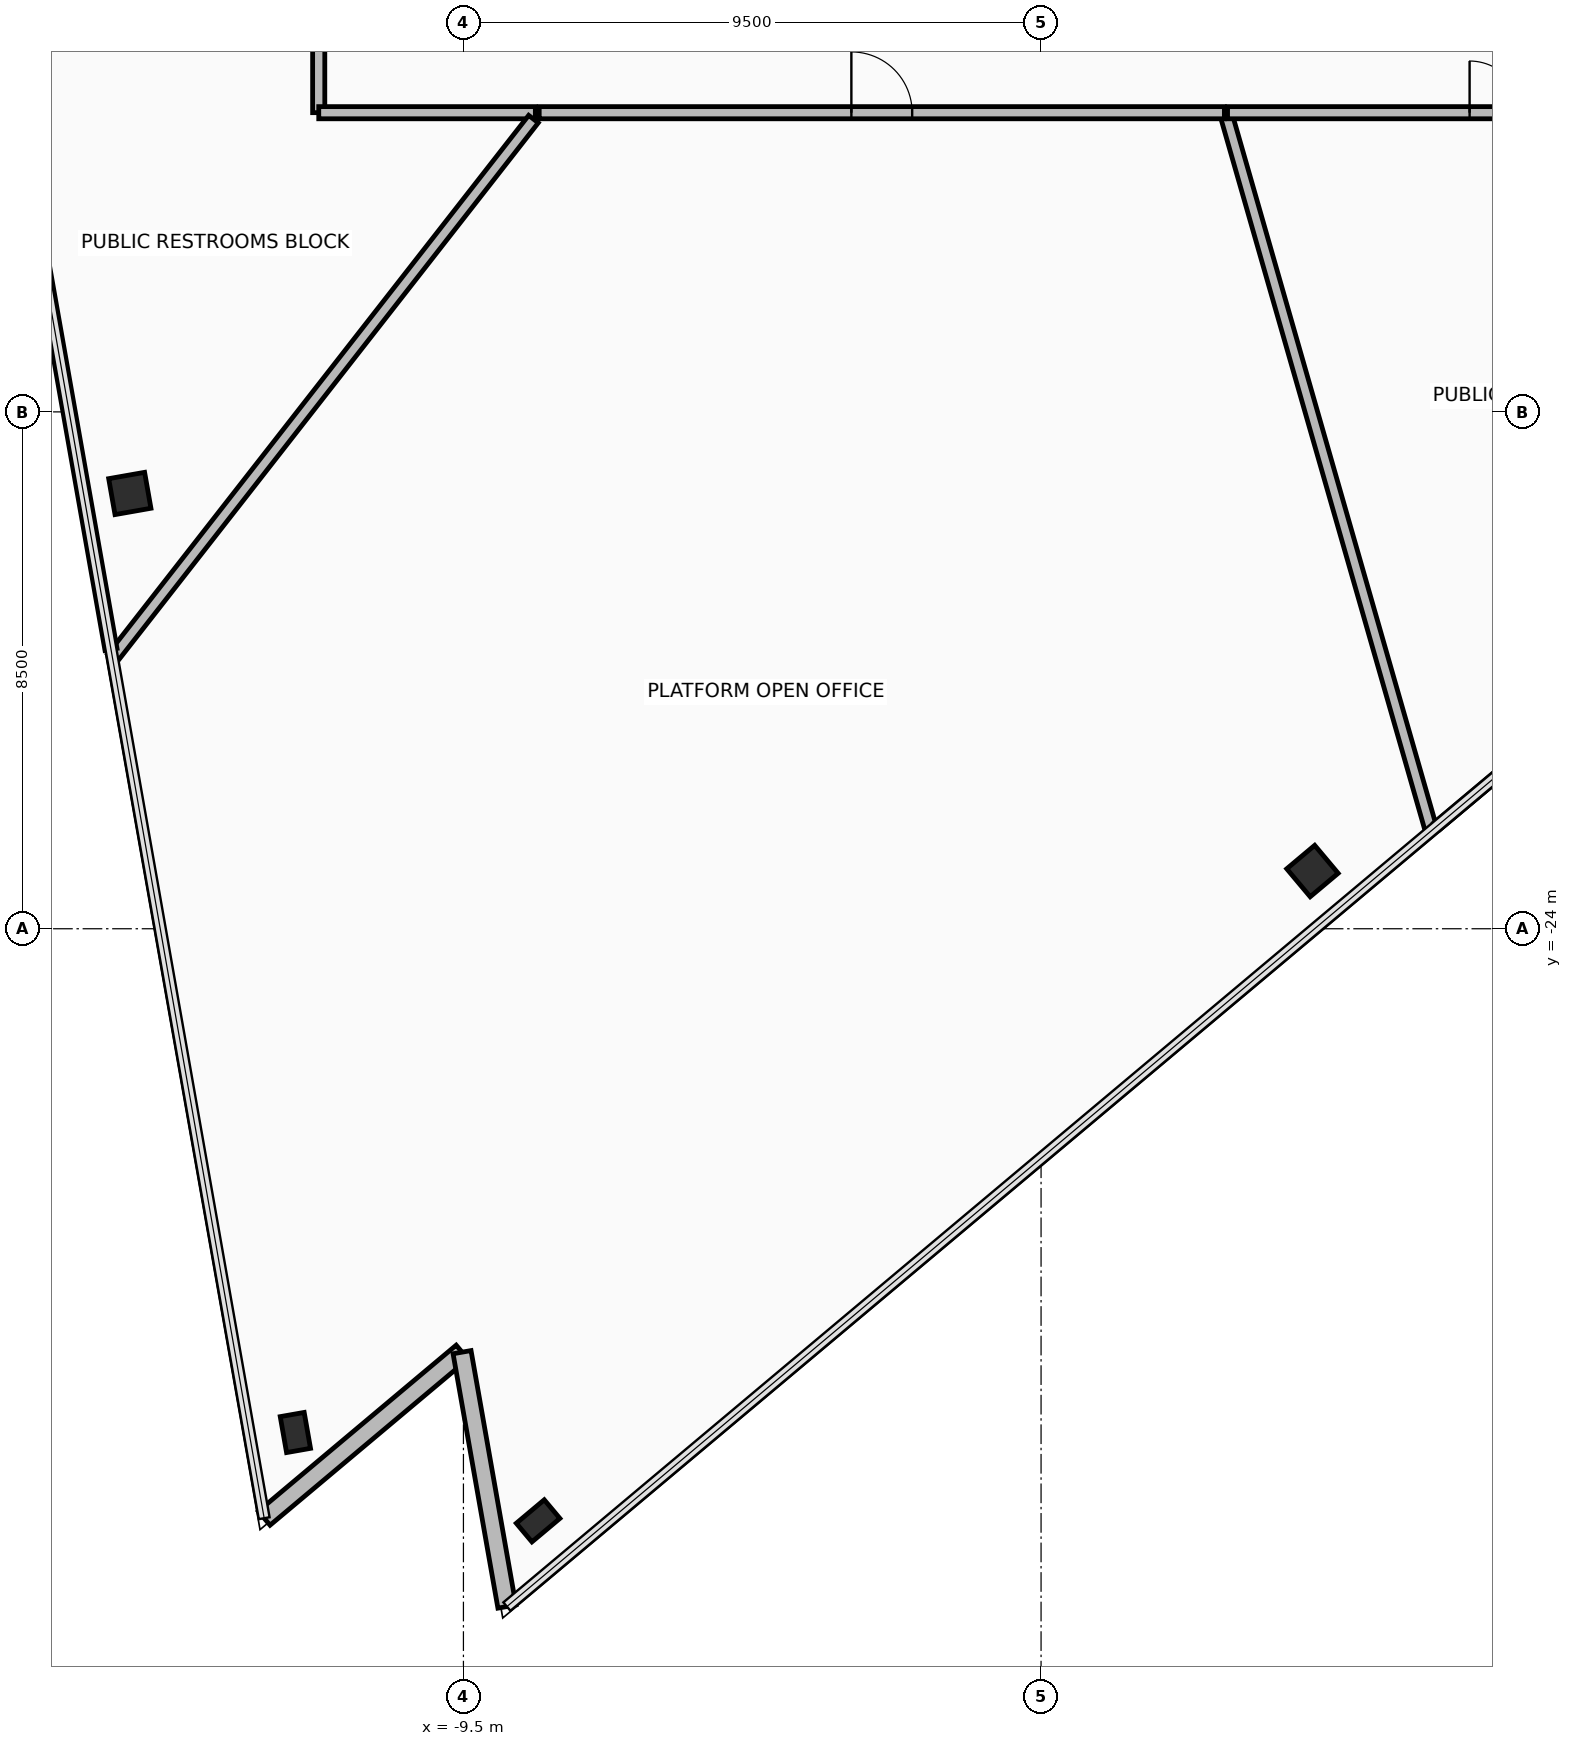
"""IFC4 building model, lengths in metres.
Left out: names, types, materials, properties, quantities, classifications, styles, units other than length and angle.
Written with IfcOpenShell. Run it as: python <this file> out.ifc"""

import sys

from ifc_helpers import new_model, si_unit, direction, frame, frame_2d, origin, origin_2d, place, context, subcontext, project, spatial, rectangle, hollow_rectangle, extrude, element, fill, save


model = new_model("IFC4")
c1 = context("Model", 3, precision=1e-05, world=origin(), true_north=direction((0.0, 1.0)))
c2 = subcontext(c1, "Body", "Model", "MODEL_VIEW")
j1 = project(units=[si_unit("LENGTHUNIT", "METRE"), si_unit("PLANEANGLEUNIT", "RADIAN")], contexts=[c1])
p1 = place(None, origin())
s1 = spatial("IfcSite", under=j1, at=p1, CompositionType="ELEMENT")
p2 = place(p1, origin())
s2 = spatial("IfcBuilding", under=s1, at=p2, CompositionType="ELEMENT")
p3 = place(p2, frame((0.0, 0.0, 188.5)))
s3 = spatial("IfcBuildingStorey", under=s2, at=p3, CompositionType="ELEMENT", Elevation=188.5)
p4 = place(p3, frame((-14.987, -16.842, 0.0), z_axis=(0.0, 0.0, 1.0), x_axis=(-0.173648177667, 0.984807753012, 0.0)))
e1 = element("IfcColumn", 1, at=p4, inside=s3, PredefinedType="COLUMN", context=c2, shape_type="SweptSolid", body=[
    extrude(hollow_rectangle(XDim=0.6, YDim=0.6, WallThickness=0.036, at=origin_2d()), origin(), (0.0, 0.0, 1.0), 3.6),
])
for number, where, z_axis, x_axis in (
    (2, (-12.264, -32.284, 0.0), (0.0, 0.0, 1.0), (-0.174, 0.985, 0.0)),
    (3, (-8.272, -33.737, 0.0), (0.0, 0.0, 1.0), (0.766, 0.643, 0.0)),
):
    element("IfcColumn", number, at=place(p3, frame(where, z_axis=z_axis, x_axis=x_axis)), inside=s3, PredefinedType="COLUMN", context=c2, shape_type="SweptSolid", body=[
        extrude(hollow_rectangle(XDim=0.4, YDim=0.6, WallThickness=0.03, at=origin_2d()), origin(), (0.0, 0.0, 1.0), 3.6),
    ])
p5 = place(p3, frame((4.463, -23.051, 0.0), z_axis=(0.0, 0.0, 1.0), x_axis=(0.766043321242, 0.642788946685, 0.0)))
e4 = element("IfcColumn", 4, at=p5, inside=s3, PredefinedType="COLUMN", context=c2, shape_type="SweptSolid", body=[
    extrude(hollow_rectangle(XDim=0.6, YDim=0.6, WallThickness=0.036, at=origin_2d()), origin(), (0.0, 0.0, 1.0), 3.6),
])
for number, where, z_axis, x_axis in (
    (5, (-12.777, -33.694, 0.0), (0.0, 0.0, 1.0), (0.766, 0.643, 0.0)),
    (6, (-9.523, -30.963, 0.0), (0.0, 0.0, 1.0), (0.174, -0.985, 0.0)),
):
    element("IfcWall", number, at=place(p3, frame(where, z_axis=z_axis, x_axis=x_axis)), inside=s3, PredefinedType="STANDARD", context=c2, shape_type="SweptSolid", body=[
        extrude(rectangle(XDim=4.248, YDim=0.3, at=frame_2d((2.124, 0.0))), origin(), (0.0, 0.0, 1.0), 2.715),
    ])
p6 = place(p3, frame((-11.88, -1.925, 0.0), z_axis=(0.0, 0.0, 1.0), x_axis=(0.0, -1.0, 0.0)))
e7 = element("IfcWall", 7, at=p6, inside=s3, PredefinedType="PARTITIONING", context=c2, shape_type="SweptSolid", body=[
    extrude(rectangle(XDim=8.654, YDim=0.2, at=frame_2d((4.327, 0.0))), origin(), (0.0, 0.0, 1.0), 2.865),
])
p7 = place(p6, frame((3.902, 0.0, 0.0)))
e8 = element("IfcOpeningElement", 8, at=p7, cuts=e7, PredefinedType="OPENING", context=c2, shape_type="SweptSolid", body=[
    extrude(rectangle(XDim=0.85, YDim=2.1, at=frame_2d((0.425, 1.05))), frame((0.0, 0.11, 0.0), z_axis=(0.0, -1.0, 0.0), x_axis=(1.0, 0.0, 0.0)), (0.0, 0.0, 1.0), 0.22),
])
p8 = place(p3, frame((-11.879, -10.58, 0.0), z_axis=(0.0, 0.0, 1.0), x_axis=(1.0, 0.0, 0.0)))
e9 = element("IfcWall", 9, at=p8, inside=s3, PredefinedType="PARTITIONING", context=c2, shape_type="SweptSolid", body=[
    extrude(rectangle(XDim=3.562, YDim=0.2, at=frame_2d((1.781, 0.0))), origin(), (0.0, 0.0, 1.0), 2.865),
])
p9 = place(p3, frame((-8.348, -10.685, 0.0), z_axis=(0.0, 0.0, 1.0), x_axis=(-0.615667634963, -0.788005941132, 0.0)))
e10 = element("IfcWall", 10, at=p9, inside=s3, PredefinedType="PARTITIONING", context=c2, shape_type="SweptSolid", body=[
    extrude(rectangle(XDim=11.245, YDim=0.2, at=frame_2d((5.623, 0.0))), origin(), (0.0, 0.0, 1.0), 2.715),
])
p10 = place(p3, frame((-15.296, -19.407, 0.0), z_axis=(0.0, 0.0, 1.0), x_axis=(-0.17365370915, 0.984806777646, 0.0)))
e11 = element("IfcWall", 11, at=p10, inside=s3, PredefinedType="PARTITIONING", context=c2, shape_type="SweptSolid", body=[
    extrude(rectangle(XDim=17.671, YDim=0.2, at=frame_2d((8.835, 0.0))), origin(), (0.0, 0.0, 1.0), 3.42),
])
p11 = place(p3, frame((6.42, -22.388, 0.0), z_axis=(0.0, 0.0, 1.0), x_axis=(-0.275623781544, 0.961265588195, 0.0)))
e12 = element("IfcWall", 12, at=p11, inside=s3, PredefinedType="PARTITIONING", context=c2, shape_type="SweptSolid", body=[
    extrude(rectangle(XDim=12.251, YDim=0.2, at=frame_2d((6.125, 0.0))), origin(), (0.0, 0.0, 1.0), 2.715),
])
p12 = place(p3, frame((3.067, -10.58, 0.0), z_axis=(0.0, 0.0, 1.0), x_axis=(1.0, 0.0, 0.0)))
e13 = element("IfcWall", 13, at=p12, inside=s3, PredefinedType="PARTITIONING", context=c2, shape_type="SweptSolid", body=[
    extrude(rectangle(XDim=8.812, YDim=0.2, at=frame_2d((4.406, 0.0))), origin(), (0.0, 0.0, 1.0), 2.865),
])
p13 = place(p12, frame((3.981, 0.0, 0.0)))
e14 = element("IfcOpeningElement", 14, at=p13, cuts=e13, PredefinedType="OPENING", context=c2, shape_type="SweptSolid", body=[
    extrude(rectangle(XDim=0.85, YDim=2.1, at=frame_2d((0.425, 1.05))), frame((0.0, 0.11, 0.0), z_axis=(0.0, -1.0, 0.0), x_axis=(1.0, 0.0, 0.0)), (0.0, 0.0, 1.0), 0.22),
])
p14 = place(p3, frame((22.994, -8.481, 0.0), z_axis=(0.0, 0.0, 1.0), x_axis=(-0.766042878482, -0.642789474343, 0.0)))
e15 = element("IfcWall", 15, at=p14, inside=s3, PredefinedType="PARTITIONING", context=c2, shape_type="SweptSolid", body=[
    extrude(rectangle(XDim=21.521, YDim=0.15, at=frame_2d((10.761, 0.0))), origin(), (0.0, 0.0, 1.0), 3.42),
])
p15 = place(p3, frame((-8.254, -10.58, 0.0), z_axis=(0.0, 0.0, 1.0), x_axis=(1.0, 0.0, 0.0)))
e16 = element("IfcWall", 16, at=p15, inside=s3, PredefinedType="PARTITIONING", context=c2, shape_type="SweptSolid", body=[
    extrude(rectangle(XDim=11.269, YDim=0.2, at=frame_2d((5.634, 0.0))), origin(), (0.0, 0.0, 1.0), 3.42),
])
p16 = place(p15, frame((5.134, 0.0, 0.0)))
e17 = element("IfcOpeningElement", 17, at=p16, cuts=e16, PredefinedType="OPENING", context=c2, shape_type="SweptSolid", body=[
    extrude(rectangle(XDim=1.0, YDim=2.15, at=frame_2d((0.5, 1.075))), frame((0.0, 0.11, 0.0), z_axis=(0.0, -1.0, 0.0), x_axis=(1.0, 0.0, 0.0)), (0.0, 0.0, 1.0), 0.22),
])
p17 = place(p13, origin())
e18 = element("IfcDoor", 18, at=p17, inside=s3, OperationType="SINGLE_SWING_RIGHT", PredefinedType="DOOR", context=c2, shape_type="SweptSolid", body=[
    extrude(rectangle(XDim=0.85, YDim=2.1, at=frame_2d((0.425, 1.05))), frame((0.0, 0.025, 0.0), z_axis=(0.0, -1.0, 0.0), x_axis=(1.0, 0.0, 0.0)), (0.0, 0.0, 1.0), 0.05),
])
fill(e14, e18)
p18 = place(p16, origin())
e19 = element("IfcDoor", 19, at=p18, inside=s3, OperationType="SINGLE_SWING_RIGHT", PredefinedType="DOOR", context=c2, shape_type="SweptSolid", body=[
    extrude(rectangle(XDim=1.0, YDim=2.15, at=frame_2d((0.5, 1.075))), frame((0.0, 0.025, 0.0), z_axis=(0.0, -1.0, 0.0), x_axis=(1.0, 0.0, 0.0)), (0.0, 0.0, 1.0), 0.05),
])
fill(e17, e19)
save(model, sys.argv[1])
